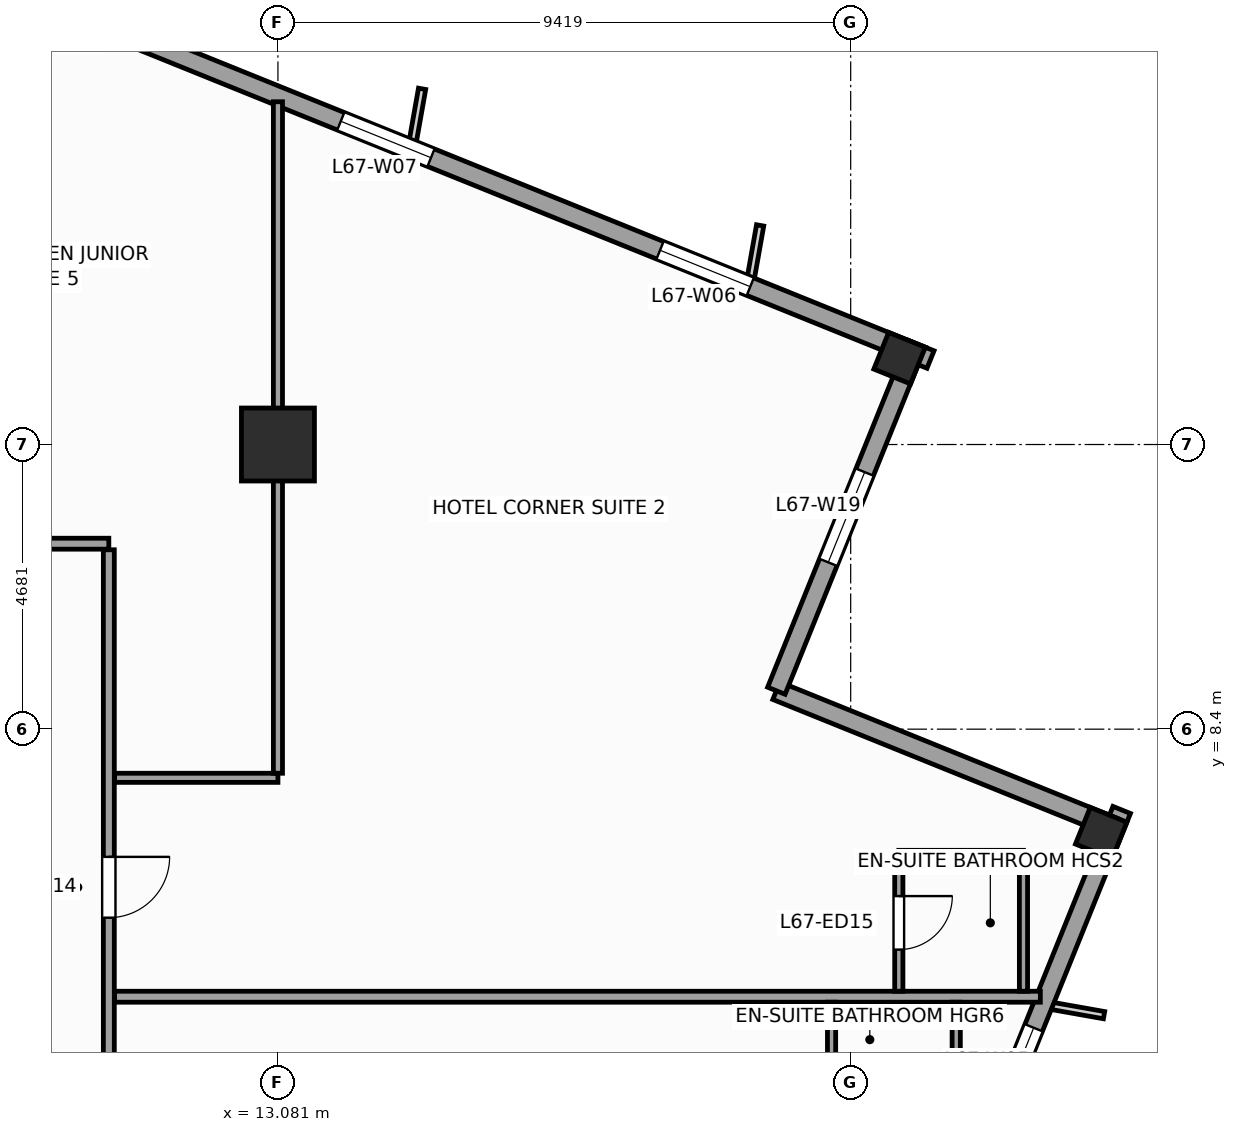
"""IFC4 building model, lengths in metres.
Left out: names, types, materials, properties, quantities, classifications, styles, units other than length and angle.
Written with IfcOpenShell. Run it as: python <this file> out.ifc"""

import sys

from ifc_helpers import new_model, si_unit, direction, frame, frame_2d, origin, origin_2d, place, context, subcontext, project, spatial, rectangle, extrude, source, transform, mapped, element, fill, save


model = new_model("IFC4")
c1 = context("Model", 3, precision=1e-05, world=origin(), true_north=direction((0.0, 1.0)))
c2 = subcontext(c1, "Body", "Model", "MODEL_VIEW")
j1 = project(units=[si_unit("LENGTHUNIT", "METRE"), si_unit("PLANEANGLEUNIT", "RADIAN")], contexts=[c1])
p1 = place(None, origin())
s1 = spatial("IfcSite", under=j1, at=p1, CompositionType="ELEMENT")
p2 = place(p1, origin())
s2 = spatial("IfcBuilding", under=s1, at=p2, CompositionType="ELEMENT")
p3 = place(p2, frame((0.0, 0.0, 276.0)))
s3 = spatial("IfcBuildingStorey", under=s2, at=p3, CompositionType="ELEMENT", Elevation=276.0)
m1 = source(origin(), c2, "Body", "SweptSolid", [
    extrude(rectangle(XDim=1.2, YDim=1.2, at=origin_2d()), origin(), (0.0, 0.0, 1.0), 3.6),
])
p4 = place(p3, frame((13.081, 13.081, 0.0), z_axis=(0.0, 0.0, 1.0), x_axis=(1.0, 0.0, 0.0)))
e1 = element("IfcColumn", 1, at=p4, inside=s3, PredefinedType="COLUMN", context=c2, shape_type="MappedRepresentation", body=[
    mapped(m1, transform((0.0, 0.0, 0.0), scale=1.0)),
])
m2 = source(origin(), c2, "Body", "SweptSolid", [
    extrude(rectangle(XDim=0.65, YDim=0.65, at=origin_2d()), origin(), (0.0, 0.0, 1.0), 3.6),
])
for number, where, z_axis, x_axis in (
    (2, (26.62, 6.69, 0.0), (0.0, 0.0, 1.0), (0.375, 0.927, 0.0)),
    (3, (23.304, 14.501, 0.0), (0.0, 0.0, 1.0), (0.375, 0.927, 0.0)),
):
    element("IfcColumn", number, at=place(p3, frame(where, z_axis=z_axis, x_axis=x_axis)), inside=s3, PredefinedType="COLUMN", context=c2, shape_type="MappedRepresentation", body=[
        mapped(m2, transform((0.0, 0.0, 0.0), scale=1.0)),
    ])
p5 = place(p3, frame((14.479, -23.813, 0.0), z_axis=(0.0, 0.0, 1.0), x_axis=(0.374609557019, 0.927182657188, 0.0)))
e4 = element("IfcWall", 4, at=p5, inside=s3, PredefinedType="STANDARD", context=c2, shape_type="SweptSolid", body=[
    extrude(rectangle(XDim=33.31, YDim=0.31, at=frame_2d((16.655, 0.0))), origin(), (0.0, 0.0, 1.0), 2.75),
])
p6 = place(p5, frame((3.197, 0.0, 0.47)))
e5 = element("IfcOpeningElement", 5, at=p6, cuts=e4, PredefinedType="OPENING", context=c2, shape_type="SweptSolid", body=[
    extrude(rectangle(XDim=1.6, YDim=2.1, at=frame_2d((0.8, 1.05))), frame((0.0, 0.165, 0.0), z_axis=(0.0, -1.0, 0.0), x_axis=(1.0, 0.0, 0.0)), (0.0, 0.0, 1.0), 0.33),
])
p7 = place(p5, frame((8.86, 0.0, 0.47)))
e6 = element("IfcOpeningElement", 6, at=p7, cuts=e4, PredefinedType="OPENING", context=c2, shape_type="SweptSolid", body=[
    extrude(rectangle(XDim=1.6, YDim=2.1, at=frame_2d((0.8, 1.05))), frame((0.0, 0.165, 0.0), z_axis=(0.0, -1.0, 0.0), x_axis=(1.0, 0.0, 0.0)), (0.0, 0.0, 1.0), 0.33),
])
p8 = place(p5, frame((14.439, 0.0, 0.47)))
e7 = element("IfcOpeningElement", 7, at=p8, cuts=e4, PredefinedType="OPENING", context=c2, shape_type="SweptSolid", body=[
    extrude(rectangle(XDim=1.6, YDim=2.1, at=frame_2d((0.8, 1.05))), frame((0.0, 0.165, 0.0), z_axis=(0.0, -1.0, 0.0), x_axis=(1.0, 0.0, 0.0)), (0.0, 0.0, 1.0), 0.33),
])
p9 = place(p5, frame((23.351, 0.0, 0.47)))
e8 = element("IfcOpeningElement", 8, at=p9, cuts=e4, PredefinedType="OPENING", context=c2, shape_type="SweptSolid", body=[
    extrude(rectangle(XDim=1.6, YDim=2.1, at=frame_2d((0.8, 1.05))), frame((0.0, 0.165, 0.0), z_axis=(0.0, -1.0, 0.0), x_axis=(1.0, 0.0, 0.0)), (0.0, 0.0, 1.0), 0.33),
])
p10 = place(p5, frame((27.847, 0.0, 0.47)))
e9 = element("IfcOpeningElement", 9, at=p10, cuts=e4, PredefinedType="OPENING", context=c2, shape_type="SweptSolid", body=[
    extrude(rectangle(XDim=1.6, YDim=2.1, at=frame_2d((0.8, 1.05))), frame((0.0, 0.165, 0.0), z_axis=(0.0, -1.0, 0.0), x_axis=(1.0, 0.0, 0.0)), (0.0, 0.0, 1.0), 0.33),
])
p11 = place(p3, frame((26.841, 6.784, 0.0), z_axis=(0.0, 0.0, 1.0), x_axis=(-0.927171722085, 0.374636620962, 0.0)))
e10 = element("IfcWall", 10, at=p11, inside=s3, PredefinedType="STANDARD", context=c2, shape_type="SweptSolid", body=[
    extrude(rectangle(XDim=6.0, YDim=0.31, at=frame_2d((3.0, 0.0))), origin(), (0.0, 0.0, 1.0), 2.65),
])
p12 = place(p3, frame((21.278, 9.032, 0.0), z_axis=(0.0, 0.0, 1.0), x_axis=(0.374602739196, 0.927185411764, 0.0)))
e11 = element("IfcWall", 11, at=p12, inside=s3, PredefinedType="STANDARD", context=c2, shape_type="SweptSolid", body=[
    extrude(rectangle(XDim=6.155, YDim=0.31, at=frame_2d((3.078, 0.0))), origin(), (0.0, 0.0, 1.0), 3.35),
])
p13 = place(p12, frame((2.278, 0.0, 0.47)))
e12 = element("IfcOpeningElement", 12, at=p13, cuts=e11, PredefinedType="OPENING", context=c2, shape_type="SweptSolid", body=[
    extrude(rectangle(XDim=1.6, YDim=2.1, at=frame_2d((0.8, 1.05))), frame((0.0, 0.165, 0.0), z_axis=(0.0, -1.0, 0.0), x_axis=(1.0, 0.0, 0.0)), (0.0, 0.0, 1.0), 0.33),
])
p14 = place(p3, frame((23.813, 14.479, 0.0), z_axis=(0.0, 0.0, 1.0), x_axis=(-0.927182657188, 0.374609557019, 0.0)))
e13 = element("IfcWall", 13, at=p14, inside=s3, PredefinedType="STANDARD", context=c2, shape_type="SweptSolid", body=[
    extrude(rectangle(XDim=33.31, YDim=0.31, at=frame_2d((16.655, 0.0))), origin(), (0.0, 0.0, 1.0), 2.75),
])
p15 = place(p14, frame((21.73, 0.0, 0.0)))
e14 = element("IfcOpeningElement", 14, at=p15, cuts=e13, PredefinedType="OPENING", context=c2, shape_type="SweptSolid", body=[
    extrude(rectangle(XDim=1.05, YDim=2.25, at=frame_2d((0.525, 1.125))), frame((0.0, 0.165, 0.0), z_axis=(0.0, -1.0, 0.0), x_axis=(1.0, 0.0, 0.0)), (0.0, 0.0, 1.0), 0.33),
])
p16 = place(p14, frame((3.197, 0.0, 0.47)))
e15 = element("IfcOpeningElement", 15, at=p16, cuts=e13, PredefinedType="OPENING", context=c2, shape_type="SweptSolid", body=[
    extrude(rectangle(XDim=1.6, YDim=2.1, at=frame_2d((0.8, 1.05))), frame((0.0, 0.165, 0.0), z_axis=(0.0, -1.0, 0.0), x_axis=(1.0, 0.0, 0.0)), (0.0, 0.0, 1.0), 0.33),
])
p17 = place(p14, frame((8.86, 0.0, 0.47)))
e16 = element("IfcOpeningElement", 16, at=p17, cuts=e13, PredefinedType="OPENING", context=c2, shape_type="SweptSolid", body=[
    extrude(rectangle(XDim=1.6, YDim=2.1, at=frame_2d((0.8, 1.05))), frame((0.0, 0.165, 0.0), z_axis=(0.0, -1.0, 0.0), x_axis=(1.0, 0.0, 0.0)), (0.0, 0.0, 1.0), 0.33),
])
p18 = place(p14, frame((14.439, 0.0, 0.47)))
e17 = element("IfcOpeningElement", 17, at=p18, cuts=e13, PredefinedType="OPENING", context=c2, shape_type="SweptSolid", body=[
    extrude(rectangle(XDim=1.6, YDim=2.1, at=frame_2d((0.8, 1.05))), frame((0.0, 0.165, 0.0), z_axis=(0.0, -1.0, 0.0), x_axis=(1.0, 0.0, 0.0)), (0.0, 0.0, 1.0), 0.33),
])
p19 = place(p14, frame((27.097, 0.0, 0.47)))
e18 = element("IfcOpeningElement", 18, at=p19, cuts=e13, PredefinedType="OPENING", context=c2, shape_type="SweptSolid", body=[
    extrude(rectangle(XDim=1.6, YDim=2.1, at=frame_2d((0.8, 1.05))), frame((0.0, 0.165, 0.0), z_axis=(0.0, -1.0, 0.0), x_axis=(1.0, 0.0, 0.0)), (0.0, 0.0, 1.0), 0.33),
])
p20 = place(p3, frame((-11.45, 11.45, 0.0), z_axis=(0.0, 0.0, 1.0), x_axis=(1.0, 0.0, 0.0)))
e19 = element("IfcWall", 19, at=p20, inside=s3, PredefinedType="PARTITIONING", context=c2, shape_type="SweptSolid", body=[
    extrude(rectangle(XDim=21.75, YDim=0.18, at=frame_2d((10.875, 0.0))), origin(), (0.0, 0.0, 1.0), 3.35),
])
p21 = place(p20, frame((2.639, 0.0, 0.0)))
e20 = element("IfcOpeningElement", 20, at=p21, cuts=e19, PredefinedType="OPENING", context=c2, shape_type="SweptSolid", body=[
    extrude(rectangle(XDim=1.0, YDim=2.15, at=frame_2d((0.5, 1.075))), frame((0.0, 0.1, 0.0), z_axis=(0.0, -1.0, 0.0), x_axis=(1.0, 0.0, 0.0)), (0.0, 0.0, 1.0), 0.2),
])
p22 = place(p20, frame((7.8, 0.0, 0.0)))
e21 = element("IfcOpeningElement", 21, at=p22, cuts=e19, PredefinedType="OPENING", context=c2, shape_type="SweptSolid", body=[
    extrude(rectangle(XDim=1.0, YDim=2.15, at=frame_2d((0.5, 1.075))), frame((0.0, 0.1, 0.0), z_axis=(0.0, -1.0, 0.0), x_axis=(1.0, 0.0, 0.0)), (0.0, 0.0, 1.0), 0.2),
])
p23 = place(p20, frame((12.65, 0.0, 0.0)))
e22 = element("IfcOpeningElement", 22, at=p23, cuts=e19, PredefinedType="OPENING", context=c2, shape_type="SweptSolid", body=[
    extrude(rectangle(XDim=1.0, YDim=2.15, at=frame_2d((0.5, 1.075))), frame((0.0, 0.1, 0.0), z_axis=(0.0, -1.0, 0.0), x_axis=(1.0, 0.0, 0.0)), (0.0, 0.0, 1.0), 0.2),
])
p24 = place(p20, frame((18.036, 0.0, 0.0)))
e23 = element("IfcOpeningElement", 23, at=p24, cuts=e19, PredefinedType="OPENING", context=c2, shape_type="SweptSolid", body=[
    extrude(rectangle(XDim=1.0, YDim=2.15, at=frame_2d((0.5, 1.075))), frame((0.0, 0.1, 0.0), z_axis=(0.0, -1.0, 0.0), x_axis=(1.0, 0.0, 0.0)), (0.0, 0.0, 1.0), 0.2),
])
p25 = place(p3, frame((10.3, -12.35, 0.0), z_axis=(0.0, 0.0, 1.0), x_axis=(0.0, 1.0, 0.0)))
e24 = element("IfcWall", 24, at=p25, inside=s3, PredefinedType="PARTITIONING", context=c2, shape_type="SweptSolid", body=[
    extrude(rectangle(XDim=23.7, YDim=0.18, at=frame_2d((11.85, 0.0))), origin(), (0.0, 0.0, 1.0), 3.35),
])
p26 = place(p25, frame((17.65, 0.0, 0.0)))
e25 = element("IfcOpeningElement", 25, at=p26, cuts=e24, PredefinedType="OPENING", context=c2, shape_type="SweptSolid", body=[
    extrude(rectangle(XDim=1.0, YDim=2.15, at=frame_2d((0.5, 1.075))), frame((0.0, 0.1, 0.0), z_axis=(0.0, -1.0, 0.0), x_axis=(1.0, 0.0, 0.0)), (0.0, 0.0, 1.0), 0.2),
])
p27 = place(p25, frame((13.85, 0.0, 0.0)))
e26 = element("IfcOpeningElement", 26, at=p27, cuts=e24, PredefinedType="OPENING", context=c2, shape_type="SweptSolid", body=[
    extrude(rectangle(XDim=1.0, YDim=2.15, at=frame_2d((0.5, 1.075))), frame((0.0, 0.1, 0.0), z_axis=(0.0, -1.0, 0.0), x_axis=(1.0, 0.0, 0.0)), (0.0, 0.0, 1.0), 0.2),
])
p28 = place(p25, frame((9.85, 0.0, 0.0)))
e27 = element("IfcOpeningElement", 27, at=p28, cuts=e24, PredefinedType="OPENING", context=c2, shape_type="SweptSolid", body=[
    extrude(rectangle(XDim=1.0, YDim=2.15, at=frame_2d((0.5, 1.075))), frame((0.0, 0.1, 0.0), z_axis=(0.0, -1.0, 0.0), x_axis=(1.0, 0.0, 0.0)), (0.0, 0.0, 1.0), 0.2),
])
p29 = place(p25, frame((6.05, 0.0, 0.0)))
e28 = element("IfcOpeningElement", 28, at=p29, cuts=e24, PredefinedType="OPENING", context=c2, shape_type="SweptSolid", body=[
    extrude(rectangle(XDim=1.0, YDim=2.15, at=frame_2d((0.5, 1.075))), frame((0.0, 0.1, 0.0), z_axis=(0.0, -1.0, 0.0), x_axis=(1.0, 0.0, 0.0)), (0.0, 0.0, 1.0), 0.2),
])
p30 = place(p3, frame((10.395, 4.0, 0.0), z_axis=(0.0, 0.0, 1.0), x_axis=(1.0, 0.0, 0.0)))
e29 = element("IfcWall", 29, at=p30, inside=s3, PredefinedType="PARTITIONING", context=c2, shape_type="SweptSolid", body=[
    extrude(rectangle(XDim=15.224, YDim=0.18, at=frame_2d((7.612, 0.0))), origin(), (0.0, 0.0, 1.0), 3.35),
])
p31 = place(p3, frame((10.395, 7.6, 0.0), z_axis=(0.0, 0.0, 1.0), x_axis=(1.0, 0.0, 0.0)))
e30 = element("IfcWall", 30, at=p31, inside=s3, PredefinedType="PARTITIONING", context=c2, shape_type="SweptSolid", body=[
    extrude(rectangle(XDim=2.686, YDim=0.15, at=frame_2d((1.343, 0.0))), origin(), (0.0, 0.0, 1.0), 3.35),
])
p32 = place(p3, frame((13.081, 7.675, 0.0), z_axis=(0.0, 0.0, 1.0), x_axis=(0.0, 1.0, 0.0)))
e31 = element("IfcWall", 31, at=p32, inside=s3, PredefinedType="PARTITIONING", context=c2, shape_type="SweptSolid", body=[
    extrude(rectangle(XDim=11.043, YDim=0.15, at=frame_2d((5.521, 0.0))), origin(), (0.0, 0.0, 1.0), 2.45),
])
p33 = place(p3, frame((25.342, 4.09, 0.0), z_axis=(0.0, 0.0, 1.0), x_axis=(0.0, 1.0, 0.0)))
e32 = element("IfcWall", 32, at=p33, inside=s3, PredefinedType="PARTITIONING", context=c2, shape_type="SweptSolid", body=[
    extrude(rectangle(XDim=2.25, YDim=0.135, at=frame_2d((1.125, 0.0))), origin(), (0.0, 0.0, 1.0), 2.75),
])
p34 = place(p3, frame((23.292, 6.34, 0.0), z_axis=(0.0, 0.0, 1.0), x_axis=(1.0, 0.0, 0.0)))
e33 = element("IfcWall", 33, at=p34, inside=s3, PredefinedType="PARTITIONING", context=c2, shape_type="SweptSolid", body=[
    extrude(rectangle(XDim=2.05, YDim=0.135, at=frame_2d((1.025, 0.0))), origin(), (0.0, 0.0, 1.0), 3.35),
])
p35 = place(p3, frame((23.292, 4.09, 0.0), z_axis=(0.0, 0.0, 1.0), x_axis=(0.0, 1.0, 0.0)))
e34 = element("IfcWall", 34, at=p35, inside=s3, PredefinedType="PARTITIONING", context=c2, shape_type="SweptSolid", body=[
    extrude(rectangle(XDim=2.25, YDim=0.135, at=frame_2d((1.125, 0.0))), origin(), (0.0, 0.0, 1.0), 2.95),
])
p36 = place(p35, frame((0.685, 0.0, 0.0)))
e35 = element("IfcOpeningElement", 35, at=p36, cuts=e34, PredefinedType="OPENING", context=c2, shape_type="SweptSolid", body=[
    extrude(rectangle(XDim=0.88, YDim=2.1, at=frame_2d((0.44, 1.05))), frame((0.0, 0.078, 0.0), z_axis=(0.0, -1.0, 0.0), x_axis=(1.0, 0.0, 0.0)), (0.0, 0.0, 1.0), 0.155),
])
for number, where, z_axis, x_axis in (
    (36, (24.236, 1.66, 0.0), (0.0, 0.0, 1.0), (0.0, 1.0, 0.0)),
    (37, (22.186, 1.66, 0.0), (0.0, 0.0, 1.0), (0.0, 1.0, 0.0)),
):
    element("IfcWall", number, at=place(p3, frame(where, z_axis=z_axis, x_axis=x_axis)), inside=s3, PredefinedType="PARTITIONING", context=c2, shape_type="SweptSolid", body=[
        extrude(rectangle(XDim=2.25, YDim=0.135, at=frame_2d((1.125, 0.0))), origin(), (0.0, 0.0, 1.0), 3.35),
    ])
m3 = source(origin(), c2, "Body", "SweptSolid", [
    extrude(rectangle(XDim=1.6, YDim=2.1, at=frame_2d((0.8, 1.05))), frame((0.0, 0.03, 0.0), z_axis=(0.0, -1.0, 0.0), x_axis=(1.0, 0.0, 0.0)), (0.0, 0.0, 1.0), 0.06),
])
p37 = place(p10, origin())
e38 = element("IfcWindow", 38, at=p37, inside=s3, PartitioningType="SINGLE_PANEL", PredefinedType="WINDOW", context=c2, shape_type="MappedRepresentation", body=[
    mapped(m3, transform((0.0, 0.0, 0.0), scale=1.0)),
])
fill(e9, e38)
p38 = place(p16, origin())
e39 = element("IfcWindow", 39, at=p38, inside=s3, PartitioningType="SINGLE_PANEL", PredefinedType="WINDOW", context=c2, shape_type="MappedRepresentation", body=[
    mapped(m3, transform((0.0, 0.0, 0.0), scale=1.0)),
])
fill(e15, e39)
p39 = place(p17, origin())
e40 = element("IfcWindow", 40, at=p39, inside=s3, PartitioningType="SINGLE_PANEL", PredefinedType="WINDOW", context=c2, shape_type="MappedRepresentation", body=[
    mapped(m3, transform((0.0, 0.0, 0.0), scale=1.0)),
])
fill(e16, e40)
p40 = place(p13, origin())
e41 = element("IfcWindow", 41, at=p40, inside=s3, PartitioningType="SINGLE_PANEL", PredefinedType="WINDOW", context=c2, shape_type="MappedRepresentation", body=[
    mapped(m3, transform((0.0, 0.0, 0.0), scale=1.0)),
])
fill(e12, e41)
m4 = source(origin(), c2, "Body", "SweptSolid", [
    extrude(rectangle(XDim=1.0, YDim=2.15, at=frame_2d((0.5, 1.075))), frame((0.0, 0.025, 0.0), z_axis=(0.0, -1.0, 0.0), x_axis=(1.0, 0.0, 0.0)), (0.0, 0.0, 1.0), 0.05),
])
p41 = place(p26, frame((1.0, 0.0, 0.0), z_axis=(0.0, 0.0, 1.0), x_axis=(-1.0, 0.0, 0.0)))
e42 = element("IfcDoor", 42, at=p41, inside=s3, OperationType="SINGLE_SWING_RIGHT", PredefinedType="DOOR", context=c2, shape_type="MappedRepresentation", body=[
    mapped(m4, transform((0.0, 0.0, 0.0), scale=1.0)),
])
fill(e25, e42)
m5 = source(origin(), c2, "Body", "SweptSolid", [
    extrude(rectangle(XDim=0.88, YDim=2.1, at=frame_2d((0.44, 1.05))), frame((0.0, 0.025, 0.0), z_axis=(0.0, -1.0, 0.0), x_axis=(1.0, 0.0, 0.0)), (0.0, 0.0, 1.0), 0.05),
])
p42 = place(p36, frame((0.88, 0.0, 0.0), z_axis=(0.0, 0.0, 1.0), x_axis=(-1.0, 0.0, 0.0)))
e43 = element("IfcDoor", 43, at=p42, inside=s3, OperationType="SINGLE_SWING_RIGHT", PredefinedType="DOOR", context=c2, shape_type="MappedRepresentation", body=[
    mapped(m5, transform((0.0, 0.0, 0.0), scale=1.0)),
])
fill(e35, e43)
save(model, sys.argv[1])
